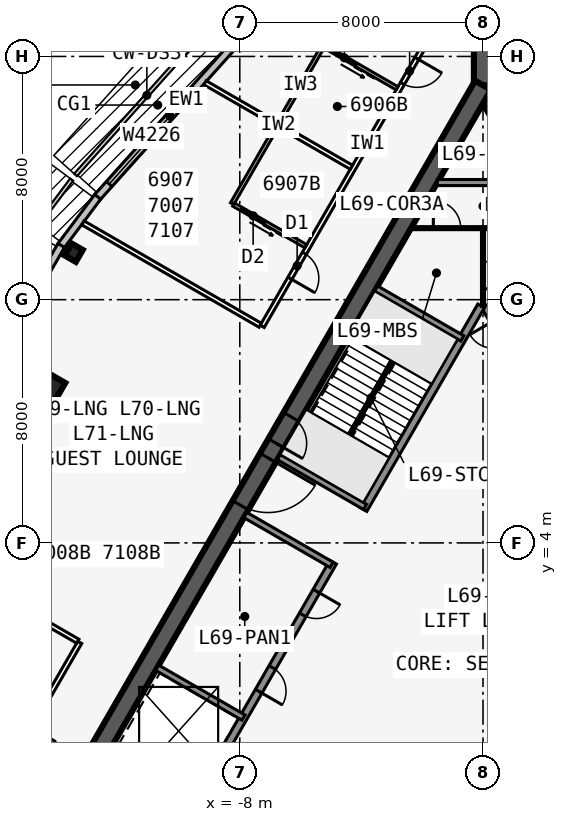
"""IFC4 building model, lengths in metres.
Left out: names, types, materials, properties, quantities, classifications, styles, units other than length and angle.
Written with IfcOpenShell. Run it as: python <this file> out.ifc"""

import sys

from ifc_helpers import new_model, si_unit, direction, frame, frame_2d, origin, origin_2d, place, context, subcontext, project, spatial, rectangle, i_section, extrude, element, fill, save


model = new_model("IFC4")
c1 = context("Model", 3, precision=1e-05, world=origin(), true_north=direction((0.0, 1.0)))
c2 = subcontext(c1, "Body", "Model", "MODEL_VIEW")
j1 = project(units=[si_unit("LENGTHUNIT", "METRE"), si_unit("PLANEANGLEUNIT", "RADIAN")], contexts=[c1])
p1 = place(None, origin())
s1 = spatial("IfcSite", under=j1, at=p1, CompositionType="ELEMENT")
p2 = place(p1, origin())
s2 = spatial("IfcBuilding", under=s1, at=p2, CompositionType="ELEMENT")
p3 = place(p2, frame((0.0, 0.0, 260.9)))
s3 = spatial("IfcBuildingStorey", under=s2, at=p3, CompositionType="ELEMENT", Elevation=260.9)
p4 = place(p3, frame((16.5, -9.526, 0.0), z_axis=(0.0, 0.0, 1.0), x_axis=(-0.499999749417, 0.866025548458, 0.0)))
e1 = element("IfcWall", 1, at=p4, inside=s3, PredefinedType="SHEAR", context=c2, shape_type="SweptSolid", body=[
    extrude(rectangle(XDim=33.0, YDim=0.6, at=frame_2d((16.5, 0.0))), origin(), (0.0, 0.0, 1.0), 3.6),
])
p5 = place(p4, frame((14.15, 0.0, 0.0)))
e2 = element("IfcOpeningElement", 2, at=p5, cuts=e1, PredefinedType="OPENING", context=c2, shape_type="SweptSolid", body=[
    extrude(rectangle(XDim=1.8, YDim=2.13, at=frame_2d((0.9, 1.065))), frame((0.0, 0.31, 0.0), z_axis=(0.0, -1.0, 0.0), x_axis=(1.0, 0.0, 0.0)), (0.0, 0.0, 1.0), 0.62),
])
p6 = place(p4, frame((12.6, 0.0, 0.0)))
e3 = element("IfcOpeningElement", 3, at=p6, cuts=e1, PredefinedType="OPENING", context=c2, shape_type="SweptSolid", body=[
    extrude(rectangle(XDim=1.0, YDim=2.13, at=frame_2d((0.5, 1.065))), frame((0.0, 0.31, 0.0), z_axis=(0.0, -1.0, 0.0), x_axis=(1.0, 0.0, 0.0)), (0.0, 0.0, 1.0), 0.62),
])
p7 = place(p3, frame((5.379, 2.586, 0.0), z_axis=(0.0, 0.0, 1.0), x_axis=(-0.500001375892, 0.866024609411, 0.0)))
e4 = element("IfcWall", 4, at=p7, inside=s3, PredefinedType="SOLIDWALL", context=c2, shape_type="SweptSolid", body=[
    extrude(rectangle(XDim=10.633, YDim=0.25, at=frame_2d((5.316, 0.0))), origin(), (0.0, 0.0, 1.0), 3.435),
])
p8 = place(p7, frame((9.164, 0.0, 0.0)))
e5 = element("IfcOpeningElement", 5, at=p8, cuts=e4, PredefinedType="OPENING", context=c2, shape_type="SweptSolid", body=[
    extrude(rectangle(XDim=0.9, YDim=2.13, at=frame_2d((0.45, 1.065))), frame((0.0, 0.135, 0.0), z_axis=(0.0, -1.0, 0.0), x_axis=(1.0, 0.0, 0.0)), (0.0, 0.0, 1.0), 0.27),
])
p9 = place(p7, frame((1.0, 0.0, 0.0)))
e6 = element("IfcOpeningElement", 6, at=p9, cuts=e4, PredefinedType="OPENING", context=c2, shape_type="SweptSolid", body=[
    extrude(rectangle(XDim=1.1, YDim=2.13, at=frame_2d((0.55, 1.065))), frame((0.0, 0.135, 0.0), z_axis=(0.0, -1.0, 0.0), x_axis=(1.0, 0.0, 0.0)), (0.0, 0.0, 1.0), 0.27),
])
p10 = place(p7, frame((3.9, 0.0, 0.0)))
e7 = element("IfcOpeningElement", 7, at=p10, cuts=e4, PredefinedType="OPENING", context=c2, shape_type="SweptSolid", body=[
    extrude(rectangle(XDim=1.1, YDim=2.13, at=frame_2d((0.55, 1.065))), frame((0.0, 0.135, 0.0), z_axis=(0.0, -1.0, 0.0), x_axis=(1.0, 0.0, 0.0)), (0.0, 0.0, 1.0), 0.27),
])
p11 = place(p7, frame((6.8, 0.0, 0.0)))
e8 = element("IfcOpeningElement", 8, at=p11, cuts=e4, PredefinedType="OPENING", context=c2, shape_type="SweptSolid", body=[
    extrude(rectangle(XDim=1.1, YDim=2.13, at=frame_2d((0.55, 1.065))), frame((0.0, 0.135, 0.0), z_axis=(0.0, -1.0, 0.0), x_axis=(1.0, 0.0, 0.0)), (0.0, 0.0, 1.0), 0.27),
])
p12 = place(p3, frame((0.0, 19.052, 0.0), z_axis=(0.0, 0.0, 1.0), x_axis=(-0.499999749417, -0.866025548458, 0.0)))
e9 = element("IfcWall", 9, at=p12, inside=s3, PredefinedType="SHEAR", context=c2, shape_type="SweptSolid", body=[
    extrude(rectangle(XDim=33.0, YDim=0.6, at=frame_2d((16.5, 0.0))), origin(), (0.0, 0.0, 1.0), 3.6),
])
p13 = place(p12, frame((14.15, 0.0, 0.0)))
e10 = element("IfcOpeningElement", 10, at=p13, cuts=e9, PredefinedType="OPENING", context=c2, shape_type="SweptSolid", body=[
    extrude(rectangle(XDim=1.8, YDim=2.13, at=frame_2d((0.9, 1.065))), frame((0.0, 0.31, 0.0), z_axis=(0.0, -1.0, 0.0), x_axis=(1.0, 0.0, 0.0)), (0.0, 0.0, 1.0), 0.62),
])
p14 = place(p12, frame((12.6, 0.0, 0.0)))
e11 = element("IfcOpeningElement", 11, at=p14, cuts=e9, PredefinedType="OPENING", context=c2, shape_type="SweptSolid", body=[
    extrude(rectangle(XDim=1.0, YDim=2.13, at=frame_2d((0.5, 1.065))), frame((0.0, 0.31, 0.0), z_axis=(0.0, -1.0, 0.0), x_axis=(1.0, 0.0, 0.0)), (0.0, 0.0, 1.0), 0.62),
])
p15 = place(p3, frame((-0.062, 11.794, 0.0), z_axis=(0.0, 0.0, 1.0), x_axis=(-0.500006680225, -0.86602154692, 0.0)))
e12 = element("IfcWall", 12, at=p15, inside=s3, PredefinedType="SOLIDWALL", context=c2, shape_type="SweptSolid", body=[
    extrude(rectangle(XDim=7.733, YDim=0.25, at=frame_2d((3.866, 0.0))), origin(), (0.0, 0.0, 1.0), 3.435),
])
p16 = place(p3, frame((-4.929, 3.365, 0.0), z_axis=(0.0, 0.0, 1.0), x_axis=(-0.499991433582, -0.866030349552, 0.0)))
e13 = element("IfcWall", 13, at=p16, inside=s3, PredefinedType="SOLIDWALL", context=c2, shape_type="SweptSolid", body=[
    extrude(rectangle(XDim=10.633, YDim=0.25, at=frame_2d((5.316, 0.0))), origin(), (0.0, 0.0, 1.0), 3.435),
])
p17 = place(p16, frame((9.164, 0.0, 0.0)))
e14 = element("IfcOpeningElement", 14, at=p17, cuts=e13, PredefinedType="OPENING", context=c2, shape_type="SweptSolid", body=[
    extrude(rectangle(XDim=0.9, YDim=2.13, at=frame_2d((0.45, 1.065))), frame((0.0, 0.135, 0.0), z_axis=(0.0, -1.0, 0.0), x_axis=(1.0, 0.0, 0.0)), (0.0, 0.0, 1.0), 0.27),
])
p18 = place(p16, frame((1.1, 0.0, 0.0)))
e15 = element("IfcOpeningElement", 15, at=p18, cuts=e13, PredefinedType="OPENING", context=c2, shape_type="SweptSolid", body=[
    extrude(rectangle(XDim=0.9, YDim=2.13, at=frame_2d((0.45, 1.065))), frame((0.0, 0.135, 0.0), z_axis=(0.0, -1.0, 0.0), x_axis=(1.0, 0.0, 0.0)), (0.0, 0.0, 1.0), 0.27),
])
p19 = place(p16, frame((4.0, 0.0, 0.0)))
e16 = element("IfcOpeningElement", 16, at=p19, cuts=e13, PredefinedType="OPENING", context=c2, shape_type="SweptSolid", body=[
    extrude(rectangle(XDim=0.9, YDim=2.13, at=frame_2d((0.45, 1.065))), frame((0.0, 0.135, 0.0), z_axis=(0.0, -1.0, 0.0), x_axis=(1.0, 0.0, 0.0)), (0.0, 0.0, 1.0), 0.27),
])
for number, where, z_axis, x_axis in (
    (17, (-0.679, 10.727, 0.0), (0.0, 0.0, 1.0), (-0.866, 0.5, 0.0)),
    (18, (-3.879, 5.184, 0.0), (0.0, 0.0, 1.0), (-0.866, 0.5, 0.0)),
    (19, (-4.979, 3.279, 0.0), (0.0, 0.0, 1.0), (-0.866, 0.5, 0.0)),
    (20, (-7.879, -1.744, 0.0), (0.0, 0.0, 1.0), (-0.866, 0.5, 0.0)),
    (21, (-9.329, -4.256, 0.0), (0.0, 0.0, 1.0), (-0.866, 0.5, 0.0)),
):
    element("IfcWall", number, at=place(p3, frame(where, z_axis=z_axis, x_axis=x_axis)), inside=s3, PredefinedType="SOLIDWALL", context=c2, shape_type="SweptSolid", body=[
        extrude(rectangle(XDim=3.275, YDim=0.2, at=frame_2d((1.637, 0.0))), origin(), (0.0, 0.0, 1.0), 3.435),
    ])
p20 = place(p3, frame((0.0, 19.052, 0.0), z_axis=(0.0, 0.0, 1.0), x_axis=(0.0, 1.0, 0.0)))
e22 = element("IfcWall", 22, at=p20, inside=s3, PredefinedType="SHEAR", context=c2, shape_type="SweptSolid", body=[
    extrude(rectangle(XDim=4.746, YDim=0.6, at=frame_2d((2.373, 0.0))), origin(), (0.0, 0.0, 1.0), 3.6),
])
p21 = place(p20, frame((1.65, 0.0, 0.0)))
e23 = element("IfcOpeningElement", 23, at=p21, cuts=e22, PredefinedType="OPENING", context=c2, shape_type="SweptSolid", body=[
    extrude(rectangle(XDim=1.8, YDim=2.13, at=frame_2d((0.9, 1.065))), frame((0.0, 0.31, 0.0), z_axis=(0.0, -1.0, 0.0), x_axis=(1.0, 0.0, 0.0)), (0.0, 0.0, 1.0), 0.62),
])
p22 = place(p3, frame((-13.461, 13.545, 0.0), z_axis=(0.0, 0.0, 1.0), x_axis=(-0.866025403784, 0.5, 0.0)))
e24 = element("IfcColumn", 24, at=p22, inside=s3, PredefinedType="COLUMN", context=c2, shape_type="SweptSolid", body=[
    extrude(i_section(OverallWidth=0.419, OverallDepth=0.455, WebThickness=0.042, FlangeThickness=0.068, at=origin_2d()), origin(), (0.0, 0.0, 1.0), 3.6),
])
p23 = place(p3, frame((-15.312, 8.84, 0.0), z_axis=(0.0, 0.0, 1.0), x_axis=(-0.866025403784, 0.5, 0.0)))
e25 = element("IfcColumn", 25, at=p23, inside=s3, PredefinedType="COLUMN", context=c2, shape_type="SweptSolid", body=[
    extrude(rectangle(XDim=2.3, YDim=2.3, at=origin_2d()), origin(), (0.0, 0.0, 1.0), 3.6),
])
p24 = place(p3, frame((-7.907, 20.701, 0.0), z_axis=(0.0, 0.0, 1.0), x_axis=(-0.667303550892, -0.744785855778, 0.0)))
e26 = element("IfcWall", 26, at=p24, inside=s3, PredefinedType="STANDARD", context=c2, shape_type="SweptSolid", body=[
    extrude(rectangle(XDim=7.153, YDim=0.25, at=frame_2d((3.576, 0.0))), origin(), (0.0, 0.0, 1.0), 3.435),
])
p25 = place(p24, frame((2.376, 0.0, 0.45)))
e27 = element("IfcOpeningElement", 27, at=p25, cuts=e26, PredefinedType="OPENING", context=c2, shape_type="SweptSolid", body=[
    extrude(rectangle(XDim=4.2, YDim=2.6, at=frame_2d((2.1, 1.3))), frame((0.0, 0.135, 0.0), z_axis=(0.0, -1.0, 0.0), x_axis=(1.0, 0.0, 0.0)), (0.0, 0.0, 1.0), 0.27),
])
p26 = place(p3, frame((-12.673, 15.382, 0.0), z_axis=(0.0, 0.0, 1.0), x_axis=(-0.599650843534, -0.800261748335, 0.0)))
e28 = element("IfcWall", 28, at=p26, inside=s3, PredefinedType="STANDARD", context=c2, shape_type="SweptSolid", body=[
    extrude(rectangle(XDim=2.014, YDim=0.25, at=frame_2d((1.007, 0.0))), origin(), (0.0, 0.0, 1.0), 3.435),
])
p27 = place(p3, frame((-13.873, 13.783, 0.0), z_axis=(0.0, 0.0, 1.0), x_axis=(-0.499993662806, -0.866029062534, 0.0)))
e29 = element("IfcWall", 29, at=p27, inside=s3, PredefinedType="STANDARD", context=c2, shape_type="SweptSolid", body=[
    extrude(rectangle(XDim=10.0, YDim=0.25, at=frame_2d((5.0, 0.0))), origin(), (0.0, 0.0, 1.0), 3.435),
])
p28 = place(p27, frame((2.9, 0.0, 0.45)))
e30 = element("IfcOpeningElement", 30, at=p28, cuts=e29, PredefinedType="OPENING", context=c2, shape_type="SweptSolid", body=[
    extrude(rectangle(XDim=4.2, YDim=2.6, at=frame_2d((2.1, 1.3))), frame((0.0, 0.135, 0.0), z_axis=(0.0, -1.0, 0.0), x_axis=(1.0, 0.0, 0.0)), (0.0, 0.0, 1.0), 0.27),
])
p29 = place(p3, frame((-0.35, 23.096, 0.0), z_axis=(0.0, 0.0, 1.0), x_axis=(-0.499996044987, -0.8660276872, 0.0)))
e31 = element("IfcWall", 31, at=p29, inside=s3, PredefinedType="PARTITIONING", context=c2, shape_type="SweptSolid", body=[
    extrude(rectangle(XDim=13.827, YDim=0.15, at=frame_2d((6.913, 0.0))), origin(), (0.0, 0.0, 1.0), 3.435),
])
p30 = place(p29, frame((3.652, 0.0, 0.0)))
e32 = element("IfcOpeningElement", 32, at=p30, cuts=e31, PredefinedType="OPENING", context=c2, shape_type="SweptSolid", body=[
    extrude(rectangle(XDim=0.95, YDim=2.13, at=frame_2d((0.475, 1.065))), frame((0.0, 0.085, 0.0), z_axis=(0.0, -1.0, 0.0), x_axis=(1.0, 0.0, 0.0)), (0.0, 0.0, 1.0), 0.17),
])
p31 = place(p29, frame((11.052, 0.0, 0.0)))
e33 = element("IfcOpeningElement", 33, at=p31, cuts=e31, PredefinedType="OPENING", context=c2, shape_type="SweptSolid", body=[
    extrude(rectangle(XDim=0.95, YDim=2.13, at=frame_2d((0.475, 1.065))), frame((0.0, 0.085, 0.0), z_axis=(0.0, -1.0, 0.0), x_axis=(1.0, 0.0, 0.0)), (0.0, 0.0, 1.0), 0.17),
])
p32 = place(p3, frame((-13.263, 0.729, 0.0), z_axis=(0.0, 0.0, 1.0), x_axis=(-0.500001642027, -0.866024455758, 0.0)))
e34 = element("IfcWall", 34, at=p32, inside=s3, PredefinedType="PARTITIONING", context=c2, shape_type="SweptSolid", body=[
    extrude(rectangle(XDim=13.827, YDim=0.15, at=frame_2d((6.914, 0.0))), origin(), (0.0, 0.0, 1.0), 3.435),
])
p33 = place(p32, frame((3.225, 0.0, 0.0)))
e35 = element("IfcOpeningElement", 35, at=p33, cuts=e34, PredefinedType="OPENING", context=c2, shape_type="SweptSolid", body=[
    extrude(rectangle(XDim=0.95, YDim=2.13, at=frame_2d((0.475, 1.065))), frame((0.0, 0.085, 0.0), z_axis=(0.0, -1.0, 0.0), x_axis=(1.0, 0.0, 0.0)), (0.0, 0.0, 1.0), 0.17),
])
p34 = place(p32, frame((9.225, 0.0, 0.0)))
e36 = element("IfcOpeningElement", 36, at=p34, cuts=e34, PredefinedType="OPENING", context=c2, shape_type="SweptSolid", body=[
    extrude(rectangle(XDim=0.95, YDim=2.13, at=frame_2d((0.475, 1.065))), frame((0.0, 0.085, 0.0), z_axis=(0.0, -1.0, 0.0), x_axis=(1.0, 0.0, 0.0)), (0.0, 0.0, 1.0), 0.17),
])
p35 = place(p3, frame((-4.329, 16.355, 0.0), z_axis=(0.0, 0.0, 1.0), x_axis=(-0.866029066823, 0.499993655377, 0.0)))
e37 = element("IfcWall", 37, at=p35, inside=s3, PredefinedType="PARTITIONING", context=c2, shape_type="SweptSolid", body=[
    extrude(rectangle(XDim=5.559, YDim=0.15, at=frame_2d((2.779, 0.0))), origin(), (0.0, 0.0, 1.0), 2.823),
])
for number, where, z_axis, x_axis in (
    (38, (-7.329, 11.159, 0.0), (0.0, 0.0, 1.0), (-0.866, 0.5, 0.0)),
    (39, (-13.329, 0.767, 0.0), (0.0, 0.0, 1.0), (-0.866, 0.5, 0.0)),
):
    element("IfcWall", number, at=place(p3, frame(where, z_axis=z_axis, x_axis=x_axis)), inside=s3, PredefinedType="PARTITIONING", context=c2, shape_type="SweptSolid", body=[
        extrude(rectangle(XDim=6.732, YDim=0.15, at=frame_2d((3.366, 0.0))), origin(), (0.0, 0.0, 1.0), 3.435),
    ])
p36 = place(p3, frame((-5.253, 20.354, 0.0), z_axis=(0.0, 0.0, 1.0), x_axis=(-0.499990139034, -0.866031096941, 0.0)))
e40 = element("IfcWall", 40, at=p36, inside=s3, PredefinedType="PLUMBINGWALL", context=c2, shape_type="SweptSolid", body=[
    extrude(rectangle(XDim=3.0, YDim=0.12, at=frame_2d((1.5, 0.0))), origin(), (0.0, 0.0, 1.0), 3.435),
])
p37 = place(p3, frame((-2.829, 18.954, 0.0), z_axis=(0.0, 0.0, 1.0), x_axis=(-0.866035715982, 0.499982138324, 0.0)))
e41 = element("IfcWall", 41, at=p37, inside=s3, PredefinedType="PLUMBINGWALL", context=c2, shape_type="SweptSolid", body=[
    extrude(rectangle(XDim=2.74, YDim=0.12, at=frame_2d((1.37, 0.0))), origin(), (0.0, 0.0, 1.0), 3.435),
])
p38 = place(p37, frame((1.55, 0.0, 0.0)))
e42 = element("IfcOpeningElement", 42, at=p38, cuts=e41, PredefinedType="OPENING", context=c2, shape_type="SweptSolid", body=[
    extrude(rectangle(XDim=0.9, YDim=2.13, at=frame_2d((0.45, 1.065))), frame((0.0, 0.07, 0.0), z_axis=(0.0, -1.0, 0.0), x_axis=(1.0, 0.0, 0.0)), (0.0, 0.0, 1.0), 0.14),
])
p39 = place(p3, frame((-6.753, 17.755, 0.0), z_axis=(0.0, 0.0, 1.0), x_axis=(-0.50002537861, -0.866010750942, 0.0)))
e43 = element("IfcWall", 43, at=p39, inside=s3, PredefinedType="PLUMBINGWALL", context=c2, shape_type="SweptSolid", body=[
    extrude(rectangle(XDim=3.0, YDim=0.12, at=frame_2d((1.5, 0.0))), origin(), (0.0, 0.0, 1.0), 3.435),
])
p40 = place(p3, frame((-5.829, 13.757, 0.0), z_axis=(0.0, 0.0, 1.0), x_axis=(-0.865997131366, 0.500048966069, 0.0)))
e44 = element("IfcWall", 44, at=p40, inside=s3, PredefinedType="PLUMBINGWALL", context=c2, shape_type="SweptSolid", body=[
    extrude(rectangle(XDim=2.74, YDim=0.12, at=frame_2d((1.37, 0.0))), origin(), (0.0, 0.0, 1.0), 3.435),
])
p41 = place(p40, frame((1.55, 0.0, 0.0)))
e45 = element("IfcOpeningElement", 45, at=p41, cuts=e44, PredefinedType="OPENING", context=c2, shape_type="SweptSolid", body=[
    extrude(rectangle(XDim=0.9, YDim=2.13, at=frame_2d((0.45, 1.065))), frame((0.0, 0.07, 0.0), z_axis=(0.0, -1.0, 0.0), x_axis=(1.0, 0.0, 0.0)), (0.0, 0.0, 1.0), 0.14),
])
p42 = place(p3, frame((-1.501, 15.853, 0.0), z_axis=(0.0, 0.0, 1.0), x_axis=(1.0, 0.0, 0.0)))
e46 = element("IfcWall", 46, at=p42, inside=s3, PredefinedType="SOLIDWALL", context=c2, shape_type="SweptSolid", body=[
    extrude(rectangle(XDim=3.002, YDim=0.2, at=frame_2d((1.501, 0.0))), origin(), (0.0, 0.0, 1.0), 3.435),
])
p43 = place(p3, frame((-2.367, 14.353, 0.0), z_axis=(0.0, 0.0, 1.0), x_axis=(1.0, 0.0, 0.0)))
e47 = element("IfcWall", 47, at=p43, inside=s3, PredefinedType="PARTITIONING", context=c2, shape_type="SweptSolid", body=[
    extrude(rectangle(XDim=4.734, YDim=0.1, at=frame_2d((2.367, 0.0))), origin(), (0.0, 0.0, 1.0), 3.435),
])
p44 = place(p43, frame((0.734, 0.0, 0.0)))
e48 = element("IfcOpeningElement", 48, at=p44, cuts=e47, PredefinedType="OPENING", context=c2, shape_type="SweptSolid", body=[
    extrude(rectangle(XDim=0.9, YDim=2.13, at=frame_2d((0.45, 1.065))), frame((0.0, 0.06, 0.0), z_axis=(0.0, -1.0, 0.0), x_axis=(1.0, 0.0, 0.0)), (0.0, 0.0, 1.0), 0.12),
])
p45 = place(p3, frame((0.0, 14.353, 0.0), z_axis=(0.0, 0.0, 1.0), x_axis=(0.0, -1.0, 0.0)))
e49 = element("IfcWall", 49, at=p45, inside=s3, PredefinedType="PARTITIONING", context=c2, shape_type="SweptSolid", body=[
    extrude(rectangle(XDim=2.575, YDim=0.1, at=frame_2d((1.288, 0.0))), origin(), (0.0, 0.0, 1.0), 3.435),
])
p46 = place(p45, frame((1.095, 0.0, 0.0)))
e50 = element("IfcOpeningElement", 50, at=p46, cuts=e49, PredefinedType="OPENING", context=c2, shape_type="SweptSolid", body=[
    extrude(rectangle(XDim=0.9, YDim=2.13, at=frame_2d((0.45, 1.065))), frame((0.0, 0.06, 0.0), z_axis=(0.0, -1.0, 0.0), x_axis=(1.0, 0.0, 0.0)), (0.0, 0.0, 1.0), 0.12),
])
p47 = place(p3, frame((-2.988, 9.978, 0.0), z_axis=(0.0, 0.0, 1.0), x_axis=(-0.499992232847, -0.866029888106, 0.0)))
e51 = element("IfcWall", 51, at=p47, inside=s3, PredefinedType="SOLIDWALL", context=c2, shape_type="SweptSolid", body=[
    extrude(rectangle(XDim=2.794, YDim=0.1, at=frame_2d((1.397, 0.0))), origin(), (0.0, 0.0, 1.0), 3.6),
])
p48 = place(p25, origin())
e52 = element("IfcWindow", 52, at=p48, inside=s3, PartitioningType="SINGLE_PANEL", PredefinedType="WINDOW", context=c2, shape_type="SweptSolid", body=[
    extrude(rectangle(XDim=4.2, YDim=2.6, at=frame_2d((2.1, 1.3))), frame((0.0, 0.03, 0.0), z_axis=(0.0, -1.0, 0.0), x_axis=(1.0, 0.0, 0.0)), (0.0, 0.0, 1.0), 0.06),
])
fill(e27, e52)
p49 = place(p38, origin())
e53 = element("IfcDoor", 53, at=p49, inside=s3, OperationType="SLIDING_TO_LEFT", PredefinedType="DOOR", context=c2, shape_type="SweptSolid", body=[
    extrude(rectangle(XDim=0.9, YDim=2.13, at=frame_2d((0.45, 1.065))), frame((0.0, 0.025, 0.0), z_axis=(0.0, -1.0, 0.0), x_axis=(1.0, 0.0, 0.0)), (0.0, 0.0, 1.0), 0.05),
])
fill(e42, e53)
p50 = place(p30, origin())
e54 = element("IfcDoor", 54, at=p50, inside=s3, OperationType="SINGLE_SWING_LEFT", PredefinedType="DOOR", context=c2, shape_type="SweptSolid", body=[
    extrude(rectangle(XDim=0.95, YDim=2.13, at=frame_2d((0.475, 1.065))), frame((0.0, 0.025, 0.0), z_axis=(0.0, -1.0, 0.0), x_axis=(1.0, 0.0, 0.0)), (0.0, 0.0, 1.0), 0.05),
])
fill(e32, e54)
p51 = place(p41, origin())
e55 = element("IfcDoor", 55, at=p51, inside=s3, OperationType="SLIDING_TO_LEFT", PredefinedType="DOOR", context=c2, shape_type="SweptSolid", body=[
    extrude(rectangle(XDim=0.9, YDim=2.13, at=frame_2d((0.45, 1.065))), frame((0.0, 0.025, 0.0), z_axis=(0.0, -1.0, 0.0), x_axis=(1.0, 0.0, 0.0)), (0.0, 0.0, 1.0), 0.05),
])
fill(e45, e55)
p52 = place(p31, origin())
e56 = element("IfcDoor", 56, at=p52, inside=s3, OperationType="SINGLE_SWING_RIGHT", PredefinedType="DOOR", context=c2, shape_type="SweptSolid", body=[
    extrude(rectangle(XDim=0.95, YDim=2.13, at=frame_2d((0.475, 1.065))), frame((0.0, 0.025, 0.0), z_axis=(0.0, -1.0, 0.0), x_axis=(1.0, 0.0, 0.0)), (0.0, 0.0, 1.0), 0.05),
])
fill(e33, e56)
p53 = place(p13, origin())
e57 = element("IfcDoor", 57, at=p53, inside=s3, OperationType="DOUBLE_DOOR_SINGLE_SWING", PredefinedType="DOOR", context=c2, shape_type="SweptSolid", body=[
    extrude(rectangle(XDim=1.8, YDim=2.13, at=frame_2d((0.9, 1.065))), frame((0.0, 0.025, 0.0), z_axis=(0.0, -1.0, 0.0), x_axis=(1.0, 0.0, 0.0)), (0.0, 0.0, 1.0), 0.05),
])
fill(e10, e57)
p54 = place(p14, origin())
e58 = element("IfcDoor", 58, at=p54, inside=s3, OperationType="SINGLE_SWING_RIGHT", PredefinedType="DOOR", context=c2, shape_type="SweptSolid", body=[
    extrude(rectangle(XDim=1.0, YDim=2.13, at=frame_2d((0.5, 1.065))), frame((0.0, 0.025, 0.0), z_axis=(0.0, -1.0, 0.0), x_axis=(1.0, 0.0, 0.0)), (0.0, 0.0, 1.0), 0.05),
])
fill(e11, e58)
p55 = place(p44, origin())
e59 = element("IfcDoor", 59, at=p55, inside=s3, OperationType="SINGLE_SWING_LEFT", PredefinedType="DOOR", context=c2, shape_type="SweptSolid", body=[
    extrude(rectangle(XDim=0.9, YDim=2.13, at=frame_2d((0.45, 1.065))), frame((0.0, 0.025, 0.0), z_axis=(0.0, -1.0, 0.0), x_axis=(1.0, 0.0, 0.0)), (0.0, 0.0, 1.0), 0.05),
])
fill(e48, e59)
p56 = place(p46, origin())
e60 = element("IfcDoor", 60, at=p56, inside=s3, OperationType="SINGLE_SWING_RIGHT", PredefinedType="DOOR", context=c2, shape_type="SweptSolid", body=[
    extrude(rectangle(XDim=0.9, YDim=2.13, at=frame_2d((0.45, 1.065))), frame((0.0, 0.025, 0.0), z_axis=(0.0, -1.0, 0.0), x_axis=(1.0, 0.0, 0.0)), (0.0, 0.0, 1.0), 0.05),
])
fill(e50, e60)
p57 = place(p18, origin())
e61 = element("IfcDoor", 61, at=p57, inside=s3, OperationType="SINGLE_SWING_LEFT", PredefinedType="DOOR", context=c2, shape_type="SweptSolid", body=[
    extrude(rectangle(XDim=0.9, YDim=2.13, at=frame_2d((0.45, 1.065))), frame((0.0, 0.025, 0.0), z_axis=(0.0, -1.0, 0.0), x_axis=(1.0, 0.0, 0.0)), (0.0, 0.0, 1.0), 0.05),
])
fill(e15, e61)
p58 = place(p19, origin())
e62 = element("IfcDoor", 62, at=p58, inside=s3, OperationType="SINGLE_SWING_RIGHT", PredefinedType="DOOR", context=c2, shape_type="SweptSolid", body=[
    extrude(rectangle(XDim=0.9, YDim=2.13, at=frame_2d((0.45, 1.065))), frame((0.0, 0.025, 0.0), z_axis=(0.0, -1.0, 0.0), x_axis=(1.0, 0.0, 0.0)), (0.0, 0.0, 1.0), 0.05),
])
fill(e16, e62)
save(model, sys.argv[1])
